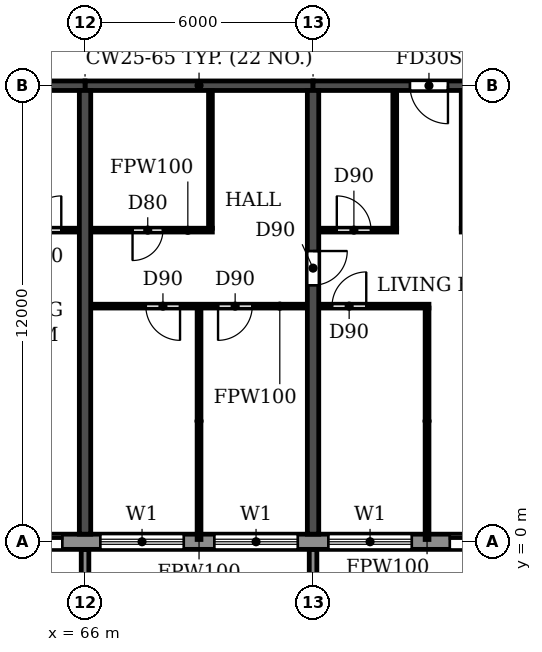
"""IFC4 building model, lengths in metres.
Left out: names, types, materials, properties, quantities, classifications, styles, units other than length and angle.
Written with IfcOpenShell. Run it as: python <this file> out.ifc"""

import sys

from ifc_helpers import new_model, si_unit, direction, frame, frame_2d, origin, place, context, subcontext, project, spatial, polyline, rectangle, outline, extrude, source, transform, mapped, element, fill, save


model = new_model("IFC4")
c1 = context("Model", 3, precision=1e-05, world=origin(), true_north=direction((0.0, 1.0)))
c2 = subcontext(c1, "Body", "Model", "MODEL_VIEW")
j1 = project(units=[si_unit("LENGTHUNIT", "METRE"), si_unit("PLANEANGLEUNIT", "RADIAN")], contexts=[c1])
p1 = place(None, origin())
s1 = spatial("IfcSite", under=j1, at=p1, CompositionType="ELEMENT")
p2 = place(p1, origin())
s2 = spatial("IfcBuilding", under=s1, at=p2, CompositionType="ELEMENT")
p3 = place(p2, frame((0.0, 0.0, 122.4)))
s3 = spatial("IfcBuildingStorey", under=s2, at=p3, CompositionType="ELEMENT", Elevation=122.4)
p4 = place(p3, frame((66.0, 0.2, 0.0), z_axis=(0.0, 0.0, 1.0), x_axis=(0.0, 1.0, 0.0)))
e1 = element("IfcWall", 1, at=p4, inside=s3, PredefinedType="SHEAR", context=c2, shape_type="SweptSolid", body=[
    extrude(rectangle(XDim=11.675, YDim=0.3, at=frame_2d((5.837, 0.0))), origin(), (0.0, 0.0, 1.0), 3.07),
])
p5 = place(p3, frame((72.0, 0.2, 0.0), z_axis=(0.0, 0.0, 1.0), x_axis=(0.0, 1.0, 0.0)))
e2 = element("IfcWall", 2, at=p5, inside=s3, PredefinedType="SHEAR", context=c2, shape_type="SweptSolid", body=[
    extrude(rectangle(XDim=11.675, YDim=0.3, at=frame_2d((5.837, 0.0))), origin(), (0.0, 0.0, 1.0), 3.07),
])
p6 = place(p5, frame((6.55, 0.0, 0.0)))
e3 = element("IfcOpeningElement", 3, at=p6, cuts=e2, PredefinedType="OPENING", context=c2, shape_type="SweptSolid", body=[
    extrude(rectangle(XDim=0.9, YDim=2.1, at=frame_2d((0.45, 1.05))), frame((0.0, 0.16, 0.0), z_axis=(0.0, -1.0, 0.0), x_axis=(1.0, 0.0, 0.0)), (0.0, 0.0, 1.0), 0.32),
])
p7 = place(p3, frame((60.0, 12.0, 0.0), z_axis=(0.0, 0.0, 1.0), x_axis=(1.0, 0.0, 0.0)))
e4 = element("IfcWall", 4, at=p7, inside=s3, PredefinedType="SHEAR", context=c2, shape_type="SweptSolid", body=[
    extrude(rectangle(XDim=6.0, YDim=0.25, at=frame_2d((3.0, 0.0))), origin(), (0.0, 0.0, 1.0), 2.47),
])
p8 = place(p7, frame((2.45, 0.0, 0.0)))
e5 = element("IfcOpeningElement", 5, at=p8, cuts=e4, PredefinedType="OPENING", context=c2, shape_type="SweptSolid", body=[
    extrude(rectangle(XDim=1.0, YDim=2.1, at=frame_2d((0.5, 1.05))), frame((0.0, 0.135, 0.0), z_axis=(0.0, -1.0, 0.0), x_axis=(1.0, 0.0, 0.0)), (0.0, 0.0, 1.0), 0.27),
])
p9 = place(p3, frame((66.0, 12.0, 0.0), z_axis=(0.0, 0.0, 1.0), x_axis=(1.0, 0.0, 0.0)))
e6 = element("IfcWall", 6, at=p9, inside=s3, PredefinedType="SHEAR", context=c2, shape_type="SweptSolid", body=[
    extrude(rectangle(XDim=6.0, YDim=0.25, at=frame_2d((3.0, 0.0))), origin(), (0.0, 0.0, 1.0), 2.47),
])
p10 = place(p3, frame((72.0, 12.0, 0.0), z_axis=(0.0, 0.0, 1.0), x_axis=(1.0, 0.0, 0.0)))
e7 = element("IfcWall", 7, at=p10, inside=s3, PredefinedType="SHEAR", context=c2, shape_type="SweptSolid", body=[
    extrude(rectangle(XDim=6.0, YDim=0.25, at=frame_2d((3.0, 0.0))), origin(), (0.0, 0.0, 1.0), 2.47),
])
p11 = place(p10, frame((2.55, 0.0, 0.0)))
e8 = element("IfcOpeningElement", 8, at=p11, cuts=e7, PredefinedType="OPENING", context=c2, shape_type="SweptSolid", body=[
    extrude(rectangle(XDim=1.0, YDim=2.1, at=frame_2d((0.5, 1.05))), frame((0.0, 0.135, 0.0), z_axis=(0.0, -1.0, 0.0), x_axis=(1.0, 0.0, 0.0)), (0.0, 0.0, 1.0), 0.27),
])
p12 = place(p3, frame((16.683, 0.0, 0.0), z_axis=(0.0, 0.0, 1.0), x_axis=(1.0, 0.0, 0.0)))
e9 = element("IfcWall", 9, at=p12, inside=s3, PredefinedType="STANDARD", context=c2, shape_type="SweptSolid", body=[
    extrude(rectangle(XDim=68.634, YDim=0.4, at=frame_2d((34.317, 0.0))), origin(), (0.0, 0.0, 1.0), 3.07),
])
p13 = place(p12, frame((1.717, 0.0, 0.9)))
e10 = element("IfcOpeningElement", 10, at=p13, cuts=e9, PredefinedType="OPENING", context=c2, shape_type="SweptSolid", body=[
    extrude(rectangle(XDim=2.2, YDim=1.5, at=frame_2d((1.1, 0.75))), frame((0.0, 0.21, 0.0), z_axis=(0.0, -1.0, 0.0), x_axis=(1.0, 0.0, 0.0)), (0.0, 0.0, 1.0), 0.42),
])
p14 = place(p12, frame((4.717, 0.0, 0.9)))
e11 = element("IfcOpeningElement", 11, at=p14, cuts=e9, PredefinedType="OPENING", context=c2, shape_type="SweptSolid", body=[
    extrude(rectangle(XDim=2.2, YDim=1.5, at=frame_2d((1.1, 0.75))), frame((0.0, 0.21, 0.0), z_axis=(0.0, -1.0, 0.0), x_axis=(1.0, 0.0, 0.0)), (0.0, 0.0, 1.0), 0.42),
])
p15 = place(p12, frame((7.717, 0.0, 0.9)))
e12 = element("IfcOpeningElement", 12, at=p15, cuts=e9, PredefinedType="OPENING", context=c2, shape_type="SweptSolid", body=[
    extrude(rectangle(XDim=2.2, YDim=1.5, at=frame_2d((1.1, 0.75))), frame((0.0, 0.21, 0.0), z_axis=(0.0, -1.0, 0.0), x_axis=(1.0, 0.0, 0.0)), (0.0, 0.0, 1.0), 0.42),
])
p16 = place(p12, frame((10.717, 0.0, 0.9)))
e13 = element("IfcOpeningElement", 13, at=p16, cuts=e9, PredefinedType="OPENING", context=c2, shape_type="SweptSolid", body=[
    extrude(rectangle(XDim=2.2, YDim=1.5, at=frame_2d((1.1, 0.75))), frame((0.0, 0.21, 0.0), z_axis=(0.0, -1.0, 0.0), x_axis=(1.0, 0.0, 0.0)), (0.0, 0.0, 1.0), 0.42),
])
p17 = place(p12, frame((13.717, 0.0, 0.9)))
e14 = element("IfcOpeningElement", 14, at=p17, cuts=e9, PredefinedType="OPENING", context=c2, shape_type="SweptSolid", body=[
    extrude(rectangle(XDim=2.2, YDim=1.5, at=frame_2d((1.1, 0.75))), frame((0.0, 0.21, 0.0), z_axis=(0.0, -1.0, 0.0), x_axis=(1.0, 0.0, 0.0)), (0.0, 0.0, 1.0), 0.42),
])
p18 = place(p12, frame((16.717, 0.0, 0.9)))
e15 = element("IfcOpeningElement", 15, at=p18, cuts=e9, PredefinedType="OPENING", context=c2, shape_type="SweptSolid", body=[
    extrude(rectangle(XDim=2.2, YDim=1.5, at=frame_2d((1.1, 0.75))), frame((0.0, 0.21, 0.0), z_axis=(0.0, -1.0, 0.0), x_axis=(1.0, 0.0, 0.0)), (0.0, 0.0, 1.0), 0.42),
])
p19 = place(p12, frame((19.717, 0.0, 0.9)))
e16 = element("IfcOpeningElement", 16, at=p19, cuts=e9, PredefinedType="OPENING", context=c2, shape_type="SweptSolid", body=[
    extrude(rectangle(XDim=2.2, YDim=1.5, at=frame_2d((1.1, 0.75))), frame((0.0, 0.21, 0.0), z_axis=(0.0, -1.0, 0.0), x_axis=(1.0, 0.0, 0.0)), (0.0, 0.0, 1.0), 0.42),
])
p20 = place(p12, frame((22.917, 0.0, 0.0)))
e17 = element("IfcOpeningElement", 17, at=p20, cuts=e9, PredefinedType="OPENING", context=c2, shape_type="SweptSolid", body=[
    extrude(rectangle(XDim=1.8, YDim=2.4, at=frame_2d((0.9, 1.2))), frame((0.0, 0.21, 0.0), z_axis=(0.0, -1.0, 0.0), x_axis=(1.0, 0.0, 0.0)), (0.0, 0.0, 1.0), 0.42),
])
p21 = place(p12, frame((25.717, 0.0, 0.9)))
e18 = element("IfcOpeningElement", 18, at=p21, cuts=e9, PredefinedType="OPENING", context=c2, shape_type="SweptSolid", body=[
    extrude(rectangle(XDim=2.2, YDim=1.5, at=frame_2d((1.1, 0.75))), frame((0.0, 0.21, 0.0), z_axis=(0.0, -1.0, 0.0), x_axis=(1.0, 0.0, 0.0)), (0.0, 0.0, 1.0), 0.42),
])
p22 = place(p12, frame((28.717, 0.0, 0.9)))
e19 = element("IfcOpeningElement", 19, at=p22, cuts=e9, PredefinedType="OPENING", context=c2, shape_type="SweptSolid", body=[
    extrude(rectangle(XDim=2.2, YDim=1.5, at=frame_2d((1.1, 0.75))), frame((0.0, 0.21, 0.0), z_axis=(0.0, -1.0, 0.0), x_axis=(1.0, 0.0, 0.0)), (0.0, 0.0, 1.0), 0.42),
])
p23 = place(p12, frame((31.717, 0.0, 0.9)))
e20 = element("IfcOpeningElement", 20, at=p23, cuts=e9, PredefinedType="OPENING", context=c2, shape_type="SweptSolid", body=[
    extrude(rectangle(XDim=2.2, YDim=1.5, at=frame_2d((1.1, 0.75))), frame((0.0, 0.21, 0.0), z_axis=(0.0, -1.0, 0.0), x_axis=(1.0, 0.0, 0.0)), (0.0, 0.0, 1.0), 0.42),
])
p24 = place(p12, frame((34.917, 0.0, 0.0)))
e21 = element("IfcOpeningElement", 21, at=p24, cuts=e9, PredefinedType="OPENING", context=c2, shape_type="SweptSolid", body=[
    extrude(rectangle(XDim=1.8, YDim=2.4, at=frame_2d((0.9, 1.2))), frame((0.0, 0.21, 0.0), z_axis=(0.0, -1.0, 0.0), x_axis=(1.0, 0.0, 0.0)), (0.0, 0.0, 1.0), 0.42),
])
p25 = place(p12, frame((37.717, 0.0, 0.9)))
e22 = element("IfcOpeningElement", 22, at=p25, cuts=e9, PredefinedType="OPENING", context=c2, shape_type="SweptSolid", body=[
    extrude(rectangle(XDim=2.2, YDim=1.5, at=frame_2d((1.1, 0.75))), frame((0.0, 0.21, 0.0), z_axis=(0.0, -1.0, 0.0), x_axis=(1.0, 0.0, 0.0)), (0.0, 0.0, 1.0), 0.42),
])
p26 = place(p12, frame((40.717, 0.0, 0.9)))
e23 = element("IfcOpeningElement", 23, at=p26, cuts=e9, PredefinedType="OPENING", context=c2, shape_type="SweptSolid", body=[
    extrude(rectangle(XDim=2.2, YDim=1.5, at=frame_2d((1.1, 0.75))), frame((0.0, 0.21, 0.0), z_axis=(0.0, -1.0, 0.0), x_axis=(1.0, 0.0, 0.0)), (0.0, 0.0, 1.0), 0.42),
])
p27 = place(p12, frame((43.717, 0.0, 0.9)))
e24 = element("IfcOpeningElement", 24, at=p27, cuts=e9, PredefinedType="OPENING", context=c2, shape_type="SweptSolid", body=[
    extrude(rectangle(XDim=2.2, YDim=1.5, at=frame_2d((1.1, 0.75))), frame((0.0, 0.21, 0.0), z_axis=(0.0, -1.0, 0.0), x_axis=(1.0, 0.0, 0.0)), (0.0, 0.0, 1.0), 0.42),
])
p28 = place(p12, frame((46.917, 0.0, 0.0)))
e25 = element("IfcOpeningElement", 25, at=p28, cuts=e9, PredefinedType="OPENING", context=c2, shape_type="SweptSolid", body=[
    extrude(rectangle(XDim=1.8, YDim=2.4, at=frame_2d((0.9, 1.2))), frame((0.0, 0.21, 0.0), z_axis=(0.0, -1.0, 0.0), x_axis=(1.0, 0.0, 0.0)), (0.0, 0.0, 1.0), 0.42),
])
p29 = place(p12, frame((49.717, 0.0, 0.9)))
e26 = element("IfcOpeningElement", 26, at=p29, cuts=e9, PredefinedType="OPENING", context=c2, shape_type="SweptSolid", body=[
    extrude(rectangle(XDim=2.2, YDim=1.5, at=frame_2d((1.1, 0.75))), frame((0.0, 0.21, 0.0), z_axis=(0.0, -1.0, 0.0), x_axis=(1.0, 0.0, 0.0)), (0.0, 0.0, 1.0), 0.42),
])
p30 = place(p12, frame((52.717, 0.0, 0.9)))
e27 = element("IfcOpeningElement", 27, at=p30, cuts=e9, PredefinedType="OPENING", context=c2, shape_type="SweptSolid", body=[
    extrude(rectangle(XDim=2.2, YDim=1.5, at=frame_2d((1.1, 0.75))), frame((0.0, 0.21, 0.0), z_axis=(0.0, -1.0, 0.0), x_axis=(1.0, 0.0, 0.0)), (0.0, 0.0, 1.0), 0.42),
])
p31 = place(p12, frame((55.717, 0.0, 0.9)))
e28 = element("IfcOpeningElement", 28, at=p31, cuts=e9, PredefinedType="OPENING", context=c2, shape_type="SweptSolid", body=[
    extrude(rectangle(XDim=2.2, YDim=1.5, at=frame_2d((1.1, 0.75))), frame((0.0, 0.21, 0.0), z_axis=(0.0, -1.0, 0.0), x_axis=(1.0, 0.0, 0.0)), (0.0, 0.0, 1.0), 0.42),
])
p32 = place(p12, frame((58.917, 0.0, 0.0)))
e29 = element("IfcOpeningElement", 29, at=p32, cuts=e9, PredefinedType="OPENING", context=c2, shape_type="SweptSolid", body=[
    extrude(rectangle(XDim=1.8, YDim=2.4, at=frame_2d((0.9, 1.2))), frame((0.0, 0.21, 0.0), z_axis=(0.0, -1.0, 0.0), x_axis=(1.0, 0.0, 0.0)), (0.0, 0.0, 1.0), 0.42),
])
p33 = place(p12, frame((61.717, 0.0, 0.9)))
e30 = element("IfcOpeningElement", 30, at=p33, cuts=e9, PredefinedType="OPENING", context=c2, shape_type="SweptSolid", body=[
    extrude(rectangle(XDim=2.2, YDim=1.5, at=frame_2d((1.1, 0.75))), frame((0.0, 0.21, 0.0), z_axis=(0.0, -1.0, 0.0), x_axis=(1.0, 0.0, 0.0)), (0.0, 0.0, 1.0), 0.42),
])
p34 = place(p12, frame((64.717, 0.0, 0.9)))
e31 = element("IfcOpeningElement", 31, at=p34, cuts=e9, PredefinedType="OPENING", context=c2, shape_type="SweptSolid", body=[
    extrude(rectangle(XDim=2.2, YDim=1.5, at=frame_2d((1.1, 0.75))), frame((0.0, 0.21, 0.0), z_axis=(0.0, -1.0, 0.0), x_axis=(1.0, 0.0, 0.0)), (0.0, 0.0, 1.0), 0.42),
])
m1 = source(origin(), c2, "Body", "SweptSolid", [
    extrude(outline(polyline([(0.0, 0.0), (0.2, 0.0), (0.2, 1.65), (0.0, 1.65), (0.0, 0.0)])), origin(), (0.0, 0.0, 1.0), 3.1),
])
for number, where in (
    (32, (65.9, -1.85, 0.0)),
    (33, (71.9, -1.85, 0.0)),
):
    element("IfcWall", number, at=place(p3, frame(where)), inside=s3, PredefinedType="STANDARD", context=c2, shape_type="MappedRepresentation", body=[
        mapped(m1, transform((0.0, 0.0, 0.0))),
    ])
p35 = place(p3, frame((66.16, 6.2, 0.0), z_axis=(0.0, 0.0, 1.0), x_axis=(1.0, 0.0, 0.0)))
e34 = element("IfcWall", 34, at=p35, inside=s3, PredefinedType="PARTITIONING", context=c2, shape_type="SweptSolid", body=[
    extrude(rectangle(XDim=5.68, YDim=0.1, at=frame_2d((2.84, 0.0))), origin(), (0.0, 0.0, 1.0), 3.07),
])
p36 = place(p35, frame((1.44, 0.0, 0.0)))
e35 = element("IfcOpeningElement", 35, at=p36, cuts=e34, PredefinedType="OPENING", context=c2, shape_type="SweptSolid", body=[
    extrude(rectangle(XDim=0.9, YDim=2.1, at=frame_2d((0.45, 1.05))), frame((0.0, 0.06, 0.0), z_axis=(0.0, -1.0, 0.0), x_axis=(1.0, 0.0, 0.0)), (0.0, 0.0, 1.0), 0.12),
])
p37 = place(p35, frame((3.34, 0.0, 0.0)))
e36 = element("IfcOpeningElement", 36, at=p37, cuts=e34, PredefinedType="OPENING", context=c2, shape_type="SweptSolid", body=[
    extrude(rectangle(XDim=0.9, YDim=2.1, at=frame_2d((0.45, 1.05))), frame((0.0, 0.06, 0.0), z_axis=(0.0, -1.0, 0.0), x_axis=(1.0, 0.0, 0.0)), (0.0, 0.0, 1.0), 0.12),
])
p38 = place(p3, frame((72.16, 6.2, 0.0), z_axis=(0.0, 0.0, 1.0), x_axis=(1.0, 0.0, 0.0)))
e37 = element("IfcWall", 37, at=p38, inside=s3, PredefinedType="PARTITIONING", context=c2, shape_type="SweptSolid", body=[
    extrude(rectangle(XDim=2.89, YDim=0.1, at=frame_2d((1.445, 0.0))), origin(), (0.0, 0.0, 1.0), 3.07),
])
p39 = place(p38, frame((0.34, 0.0, 0.0)))
e38 = element("IfcOpeningElement", 38, at=p39, cuts=e37, PredefinedType="OPENING", context=c2, shape_type="SweptSolid", body=[
    extrude(rectangle(XDim=0.9, YDim=2.1, at=frame_2d((0.45, 1.05))), frame((0.0, 0.06, 0.0), z_axis=(0.0, -1.0, 0.0), x_axis=(1.0, 0.0, 0.0)), (0.0, 0.0, 1.0), 0.12),
])
p40 = place(p3, frame((63.8, 8.2, 0.0), z_axis=(0.0, 0.0, 1.0), x_axis=(1.0, 0.0, 0.0)))
e39 = element("IfcWall", 39, at=p40, inside=s3, PredefinedType="PARTITIONING", context=c2, shape_type="SweptSolid", body=[
    extrude(rectangle(XDim=2.04, YDim=0.1, at=frame_2d((1.02, 0.0))), origin(), (0.0, 0.0, 1.0), 3.07),
])
p41 = place(p40, frame((0.675, 0.0, 0.0)))
e40 = element("IfcOpeningElement", 40, at=p41, cuts=e39, PredefinedType="OPENING", context=c2, shape_type="SweptSolid", body=[
    extrude(rectangle(XDim=0.9, YDim=2.1, at=frame_2d((0.45, 1.05))), frame((0.0, 0.06, 0.0), z_axis=(0.0, -1.0, 0.0), x_axis=(1.0, 0.0, 0.0)), (0.0, 0.0, 1.0), 0.12),
])
p42 = place(p3, frame((66.16, 8.2, 0.0), z_axis=(0.0, 0.0, 1.0), x_axis=(1.0, 0.0, 0.0)))
e41 = element("IfcWall", 41, at=p42, inside=s3, PredefinedType="PARTITIONING", context=c2, shape_type="SweptSolid", body=[
    extrude(rectangle(XDim=3.19, YDim=0.1, at=frame_2d((1.595, 0.0))), origin(), (0.0, 0.0, 1.0), 3.07),
])
p43 = place(p42, frame((1.09, 0.0, 0.0)))
e42 = element("IfcOpeningElement", 42, at=p43, cuts=e41, PredefinedType="OPENING", context=c2, shape_type="SweptSolid", body=[
    extrude(rectangle(XDim=0.8, YDim=2.1, at=frame_2d((0.4, 1.05))), frame((0.0, 0.06, 0.0), z_axis=(0.0, -1.0, 0.0), x_axis=(1.0, 0.0, 0.0)), (0.0, 0.0, 1.0), 0.12),
])
p44 = place(p3, frame((72.16, 8.2, 0.0), z_axis=(0.0, 0.0, 1.0), x_axis=(1.0, 0.0, 0.0)))
e43 = element("IfcWall", 43, at=p44, inside=s3, PredefinedType="PARTITIONING", context=c2, shape_type="SweptSolid", body=[
    extrude(rectangle(XDim=2.04, YDim=0.1, at=frame_2d((1.02, 0.0))), origin(), (0.0, 0.0, 1.0), 3.07),
])
p45 = place(p44, frame((0.465, 0.0, 0.0)))
e44 = element("IfcOpeningElement", 44, at=p45, cuts=e43, PredefinedType="OPENING", context=c2, shape_type="SweptSolid", body=[
    extrude(rectangle(XDim=0.9, YDim=2.1, at=frame_2d((0.45, 1.05))), frame((0.0, 0.06, 0.0), z_axis=(0.0, -1.0, 0.0), x_axis=(1.0, 0.0, 0.0)), (0.0, 0.0, 1.0), 0.12),
])
p46 = place(p3, frame((75.9, 8.2, 0.0), z_axis=(0.0, 0.0, 1.0), x_axis=(1.0, 0.0, 0.0)))
e45 = element("IfcWall", 45, at=p46, inside=s3, PredefinedType="PARTITIONING", context=c2, shape_type="SweptSolid", body=[
    extrude(rectangle(XDim=1.94, YDim=0.1, at=frame_2d((0.97, 0.0))), origin(), (0.0, 0.0, 1.0), 3.07),
])
p47 = place(p46, frame((0.675, 0.0, 0.0)))
e46 = element("IfcOpeningElement", 46, at=p47, cuts=e45, PredefinedType="OPENING", context=c2, shape_type="SweptSolid", body=[
    extrude(rectangle(XDim=0.8, YDim=2.1, at=frame_2d((0.4, 1.05))), frame((0.0, 0.06, 0.0), z_axis=(0.0, -1.0, 0.0), x_axis=(1.0, 0.0, 0.0)), (0.0, 0.0, 1.0), 0.12),
])
p48 = place(p3, frame((69.0, 0.06, 0.0), z_axis=(0.0, 0.0, 1.0), x_axis=(0.0, 1.0, 0.0)))
e47 = element("IfcWall", 47, at=p48, inside=s3, PredefinedType="PARTITIONING", context=c2, shape_type="SweptSolid", body=[
    extrude(rectangle(XDim=6.09, YDim=0.1, at=frame_2d((3.045, 0.0))), origin(), (0.0, 0.0, 1.0), 3.07),
])
for number, where, z_axis, x_axis in (
    (48, (69.3, 8.25, 0.0), (0.0, 0.0, 1.0), (0.0, 1.0, 0.0)),
    (49, (74.15, 8.25, 0.0), (0.0, 0.0, 1.0), (0.0, 1.0, 0.0)),
):
    element("IfcWall", number, at=place(p3, frame(where, z_axis=z_axis, x_axis=x_axis)), inside=s3, PredefinedType="PARTITIONING", context=c2, shape_type="SweptSolid", body=[
        extrude(rectangle(XDim=3.615, YDim=0.1, at=frame_2d((1.808, 0.0))), origin(), (0.0, 0.0, 1.0), 3.07),
    ])
p49 = place(p3, frame((75.0, 0.06, 0.0), z_axis=(0.0, 0.0, 1.0), x_axis=(0.0, 1.0, 0.0)))
e50 = element("IfcWall", 50, at=p49, inside=s3, PredefinedType="PARTITIONING", context=c2, shape_type="SweptSolid", body=[
    extrude(rectangle(XDim=6.09, YDim=0.1, at=frame_2d((3.045, 0.0))), origin(), (0.0, 0.0, 1.0), 3.07),
])
p50 = place(p3, frame((75.95, 8.25, 0.0), z_axis=(0.0, 0.0, 1.0), x_axis=(0.0, 1.0, 0.0)))
e51 = element("IfcWall", 51, at=p50, inside=s3, PredefinedType="PARTITIONING", context=c2, shape_type="SweptSolid", body=[
    extrude(rectangle(XDim=3.615, YDim=0.1, at=frame_2d((1.808, 0.0))), origin(), (0.0, 0.0, 1.0), 3.07),
])
p51 = place(p28, origin())
e52 = element("IfcDoor", 52, at=p51, inside=s3, OperationType="DOUBLE_DOOR_SLIDING", PredefinedType="DOOR", context=c2, shape_type="SweptSolid", body=[
    extrude(rectangle(XDim=1.8, YDim=2.4, at=frame_2d((0.9, 1.2))), frame((0.0, 0.025, 0.0), z_axis=(0.0, -1.0, 0.0), x_axis=(1.0, 0.0, 0.0)), (0.0, 0.0, 1.0), 0.05),
])
fill(e25, e52)
p52 = place(p29, origin())
e53 = element("IfcWindow", 53, at=p52, inside=s3, PartitioningType="DOUBLE_PANEL_HORIZONTAL", PredefinedType="WINDOW", context=c2, shape_type="SweptSolid", body=[
    extrude(rectangle(XDim=2.2, YDim=1.5, at=frame_2d((1.1, 0.75))), frame((0.0, 0.03, 0.0), z_axis=(0.0, -1.0, 0.0), x_axis=(1.0, 0.0, 0.0)), (0.0, 0.0, 1.0), 0.06),
])
fill(e26, e53)
p53 = place(p30, origin())
e54 = element("IfcWindow", 54, at=p53, inside=s3, PartitioningType="DOUBLE_PANEL_HORIZONTAL", PredefinedType="WINDOW", context=c2, shape_type="SweptSolid", body=[
    extrude(rectangle(XDim=2.2, YDim=1.5, at=frame_2d((1.1, 0.75))), frame((0.0, 0.03, 0.0), z_axis=(0.0, -1.0, 0.0), x_axis=(1.0, 0.0, 0.0)), (0.0, 0.0, 1.0), 0.06),
])
fill(e27, e54)
p54 = place(p31, origin())
e55 = element("IfcWindow", 55, at=p54, inside=s3, PartitioningType="DOUBLE_PANEL_HORIZONTAL", PredefinedType="WINDOW", context=c2, shape_type="SweptSolid", body=[
    extrude(rectangle(XDim=2.2, YDim=1.5, at=frame_2d((1.1, 0.75))), frame((0.0, 0.03, 0.0), z_axis=(0.0, -1.0, 0.0), x_axis=(1.0, 0.0, 0.0)), (0.0, 0.0, 1.0), 0.06),
])
fill(e28, e55)
p55 = place(p32, origin())
e56 = element("IfcDoor", 56, at=p55, inside=s3, OperationType="DOUBLE_DOOR_SLIDING", PredefinedType="DOOR", context=c2, shape_type="SweptSolid", body=[
    extrude(rectangle(XDim=1.8, YDim=2.4, at=frame_2d((0.9, 1.2))), frame((0.0, 0.025, 0.0), z_axis=(0.0, -1.0, 0.0), x_axis=(1.0, 0.0, 0.0)), (0.0, 0.0, 1.0), 0.05),
])
fill(e29, e56)
p56 = place(p41, origin())
e57 = element("IfcDoor", 57, at=p56, inside=s3, OperationType="SINGLE_SWING_RIGHT", PredefinedType="DOOR", context=c2, shape_type="SweptSolid", body=[
    extrude(rectangle(XDim=0.9, YDim=2.1, at=frame_2d((0.45, 1.05))), frame((0.0, 0.025, 0.0), z_axis=(0.0, -1.0, 0.0), x_axis=(1.0, 0.0, 0.0)), (0.0, 0.0, 1.0), 0.05),
])
fill(e40, e57)
p57 = place(p43, frame((0.8, 0.0, 0.0), z_axis=(0.0, 0.0, 1.0), x_axis=(-1.0, 0.0, 0.0)))
e58 = element("IfcDoor", 58, at=p57, inside=s3, OperationType="SINGLE_SWING_RIGHT", PredefinedType="DOOR", context=c2, shape_type="SweptSolid", body=[
    extrude(rectangle(XDim=0.8, YDim=2.1, at=frame_2d((0.4, 1.05))), frame((0.0, 0.025, 0.0), z_axis=(0.0, -1.0, 0.0), x_axis=(1.0, 0.0, 0.0)), (0.0, 0.0, 1.0), 0.05),
])
fill(e42, e58)
p58 = place(p36, frame((0.9, 0.0, 0.0), z_axis=(0.0, 0.0, 1.0), x_axis=(-1.0, 0.0, 0.0)))
e59 = element("IfcDoor", 59, at=p58, inside=s3, OperationType="SINGLE_SWING_LEFT", PredefinedType="DOOR", context=c2, shape_type="SweptSolid", body=[
    extrude(rectangle(XDim=0.9, YDim=2.1, at=frame_2d((0.45, 1.05))), frame((0.0, 0.025, 0.0), z_axis=(0.0, -1.0, 0.0), x_axis=(1.0, 0.0, 0.0)), (0.0, 0.0, 1.0), 0.05),
])
fill(e35, e59)
p59 = place(p37, frame((0.9, 0.0, 0.0), z_axis=(0.0, 0.0, 1.0), x_axis=(-1.0, 0.0, 0.0)))
e60 = element("IfcDoor", 60, at=p59, inside=s3, OperationType="SINGLE_SWING_RIGHT", PredefinedType="DOOR", context=c2, shape_type="SweptSolid", body=[
    extrude(rectangle(XDim=0.9, YDim=2.1, at=frame_2d((0.45, 1.05))), frame((0.0, 0.025, 0.0), z_axis=(0.0, -1.0, 0.0), x_axis=(1.0, 0.0, 0.0)), (0.0, 0.0, 1.0), 0.05),
])
fill(e36, e60)
p60 = place(p6, frame((0.9, 0.0, 0.0), z_axis=(0.0, 0.0, 1.0), x_axis=(-1.0, 0.0, 0.0)))
e61 = element("IfcDoor", 61, at=p60, inside=s3, OperationType="SINGLE_SWING_LEFT", PredefinedType="DOOR", context=c2, shape_type="SweptSolid", body=[
    extrude(rectangle(XDim=0.9, YDim=2.1, at=frame_2d((0.45, 1.05))), frame((0.0, 0.025, 0.0), z_axis=(0.0, -1.0, 0.0), x_axis=(1.0, 0.0, 0.0)), (0.0, 0.0, 1.0), 0.05),
])
fill(e3, e61)
p61 = place(p39, origin())
e62 = element("IfcDoor", 62, at=p61, inside=s3, OperationType="SINGLE_SWING_RIGHT", PredefinedType="DOOR", context=c2, shape_type="SweptSolid", body=[
    extrude(rectangle(XDim=0.9, YDim=2.1, at=frame_2d((0.45, 1.05))), frame((0.0, 0.025, 0.0), z_axis=(0.0, -1.0, 0.0), x_axis=(1.0, 0.0, 0.0)), (0.0, 0.0, 1.0), 0.05),
])
fill(e38, e62)
p62 = place(p45, origin())
e63 = element("IfcDoor", 63, at=p62, inside=s3, OperationType="SINGLE_SWING_LEFT", PredefinedType="DOOR", context=c2, shape_type="SweptSolid", body=[
    extrude(rectangle(XDim=0.9, YDim=2.1, at=frame_2d((0.45, 1.05))), frame((0.0, 0.025, 0.0), z_axis=(0.0, -1.0, 0.0), x_axis=(1.0, 0.0, 0.0)), (0.0, 0.0, 1.0), 0.05),
])
fill(e44, e63)
p63 = place(p11, frame((1.0, 0.0, 0.0), z_axis=(0.0, 0.0, 1.0), x_axis=(-1.0, 0.0, 0.0)))
e64 = element("IfcDoor", 64, at=p63, inside=s3, OperationType="SINGLE_SWING_LEFT", PredefinedType="DOOR", context=c2, shape_type="SweptSolid", body=[
    extrude(rectangle(XDim=1.0, YDim=2.1, at=frame_2d((0.5, 1.05))), frame((0.0, 0.025, 0.0), z_axis=(0.0, -1.0, 0.0), x_axis=(1.0, 0.0, 0.0)), (0.0, 0.0, 1.0), 0.05),
])
fill(e8, e64)
save(model, sys.argv[1])
